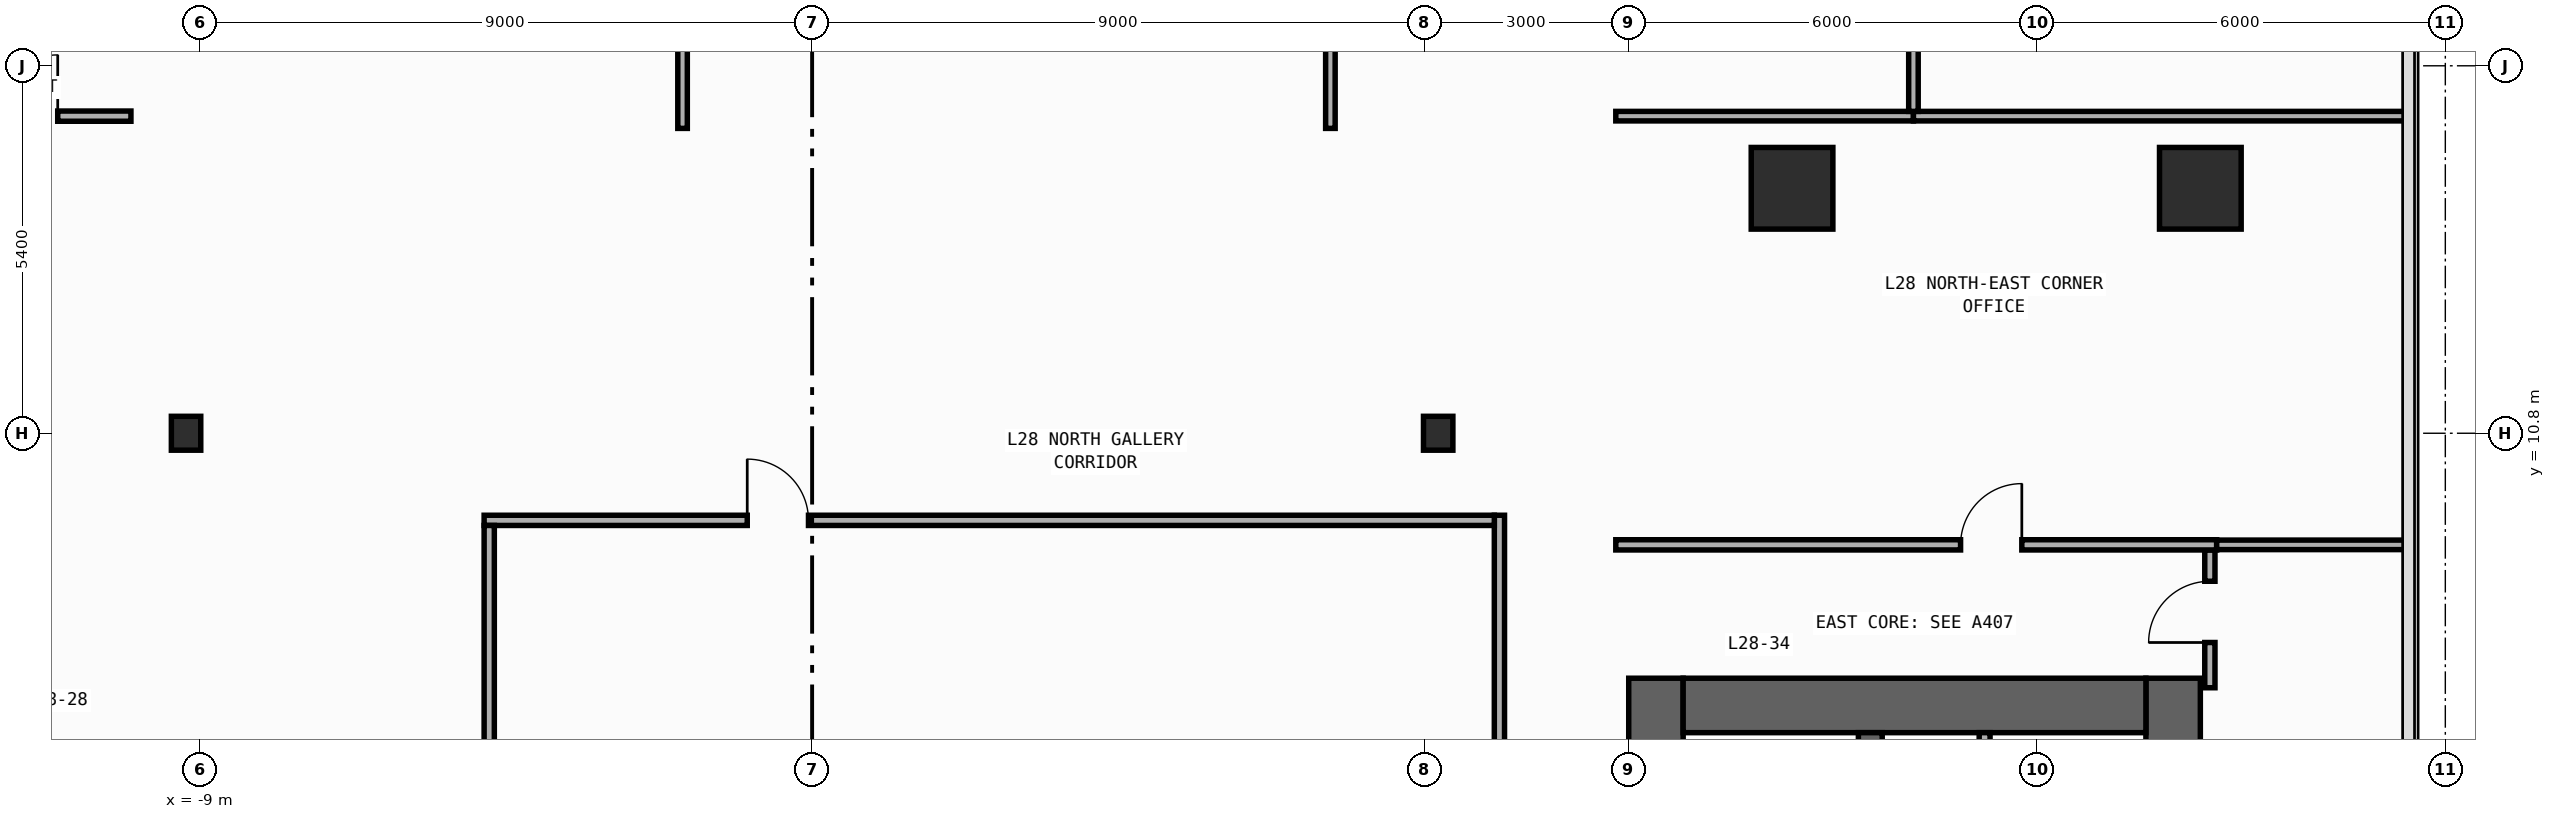
"""IFC4 building model, lengths in metres.
Left out: names, types, materials, properties, quantities, classifications, styles, units other than length and angle.
Written with IfcOpenShell. Run it as: python <this file> out.ifc"""

import sys

from ifc_helpers import new_model, si_unit, direction, frame, frame_2d, origin, origin_2d, place, context, subcontext, project, spatial, rectangle, i_section, extrude, element, fill, save


model = new_model("IFC4")
c1 = context("Model", 3, precision=1e-05, world=origin(), true_north=direction((0.0, 1.0)))
c2 = subcontext(c1, "Body", "Model", "MODEL_VIEW")
j1 = project(units=[si_unit("LENGTHUNIT", "METRE"), si_unit("PLANEANGLEUNIT", "RADIAN")], contexts=[c1])
p1 = place(None, origin())
s1 = spatial("IfcSite", under=j1, at=p1, CompositionType="ELEMENT")
p2 = place(p1, origin())
s2 = spatial("IfcBuilding", under=s1, at=p2, CompositionType="ELEMENT")
p3 = place(p2, frame((0.0, 0.0, 122.6)))
s3 = spatial("IfcBuildingStorey", under=s2, at=p3, CompositionType="ELEMENT", Elevation=122.6)
p4 = place(p3, frame((12.4, -19.8, 0.0), z_axis=(0.0, 0.0, 1.0), x_axis=(0.0, 1.0, 0.0)))
e1 = element("IfcWall", 1, at=p4, inside=s3, PredefinedType="SHEAR", context=c2, shape_type="SweptSolid", body=[
    extrude(rectangle(XDim=27.0, YDim=0.8, at=frame_2d((13.5, 0.0))), origin(), (0.0, 0.0, 1.0), 3.94),
])
p5 = place(p4, frame((23.05, 0.0, 0.0)))
e2 = element("IfcOpeningElement", 2, at=p5, cuts=e1, PredefinedType="OPENING", context=c2, shape_type="SweptSolid", body=[
    extrude(rectangle(XDim=1.1, YDim=2.2, at=frame_2d((0.55, 1.1))), frame((0.0, 0.41, 0.0), z_axis=(0.0, -1.0, 0.0), x_axis=(1.0, 0.0, 0.0)), (0.0, 0.0, 1.0), 0.82),
])
p6 = place(p4, frame((19.85, 0.0, 0.0)))
e3 = element("IfcOpeningElement", 3, at=p6, cuts=e1, PredefinedType="OPENING", context=c2, shape_type="SweptSolid", body=[
    extrude(rectangle(XDim=1.1, YDim=2.2, at=frame_2d((0.55, 1.1))), frame((0.0, 0.41, 0.0), z_axis=(0.0, -1.0, 0.0), x_axis=(1.0, 0.0, 0.0)), (0.0, 0.0, 1.0), 0.82),
])
p7 = place(p4, frame((16.65, 0.0, 0.0)))
e4 = element("IfcOpeningElement", 4, at=p7, cuts=e1, PredefinedType="OPENING", context=c2, shape_type="SweptSolid", body=[
    extrude(rectangle(XDim=1.1, YDim=2.2, at=frame_2d((0.55, 1.1))), frame((0.0, 0.41, 0.0), z_axis=(0.0, -1.0, 0.0), x_axis=(1.0, 0.0, 0.0)), (0.0, 0.0, 1.0), 0.82),
])
p8 = place(p4, frame((7.175, 0.0, 0.0)))
e5 = element("IfcOpeningElement", 5, at=p8, cuts=e1, PredefinedType="OPENING", context=c2, shape_type="SweptSolid", body=[
    extrude(rectangle(XDim=0.85, YDim=2.1, at=frame_2d((0.425, 1.05))), frame((0.0, 0.41, 0.0), z_axis=(0.0, -1.0, 0.0), x_axis=(1.0, 0.0, 0.0)), (0.0, 0.0, 1.0), 0.82),
])
p9 = place(p4, frame((10.375, 0.0, 0.0)))
e6 = element("IfcOpeningElement", 6, at=p9, cuts=e1, PredefinedType="OPENING", context=c2, shape_type="SweptSolid", body=[
    extrude(rectangle(XDim=0.85, YDim=2.1, at=frame_2d((0.425, 1.05))), frame((0.0, 0.41, 0.0), z_axis=(0.0, -1.0, 0.0), x_axis=(1.0, 0.0, 0.0)), (0.0, 0.0, 1.0), 0.82),
])
p10 = place(p4, frame((12.725, 0.0, 0.0)))
e7 = element("IfcOpeningElement", 7, at=p10, cuts=e1, PredefinedType="OPENING", context=c2, shape_type="SweptSolid", body=[
    extrude(rectangle(XDim=1.15, YDim=2.2, at=frame_2d((0.575, 1.1))), frame((0.0, 0.41, 0.0), z_axis=(0.0, -1.0, 0.0), x_axis=(1.0, 0.0, 0.0)), (0.0, 0.0, 1.0), 0.82),
])
p11 = place(p4, frame((25.125, 0.0, 0.0)))
e8 = element("IfcOpeningElement", 8, at=p11, cuts=e1, PredefinedType="OPENING", context=c2, shape_type="SweptSolid", body=[
    extrude(rectangle(XDim=0.85, YDim=2.1, at=frame_2d((0.425, 1.05))), frame((0.0, 0.41, 0.0), z_axis=(0.0, -1.0, 0.0), x_axis=(1.0, 0.0, 0.0)), (0.0, 0.0, 1.0), 0.82),
])
p12 = place(p3, frame((20.0, -19.8, 0.0), z_axis=(0.0, 0.0, 1.0), x_axis=(0.0, 1.0, 0.0)))
e9 = element("IfcWall", 9, at=p12, inside=s3, PredefinedType="SHEAR", context=c2, shape_type="SweptSolid", body=[
    extrude(rectangle(XDim=27.0, YDim=0.8, at=frame_2d((13.5, 0.0))), origin(), (0.0, 0.0, 1.0), 3.94),
])
p13 = place(p3, frame((12.8, 6.8, 0.0), z_axis=(0.0, 0.0, 1.0), x_axis=(1.0, 0.0, 0.0)))
e10 = element("IfcWall", 10, at=p13, inside=s3, PredefinedType="SHEAR", context=c2, shape_type="SweptSolid", body=[
    extrude(rectangle(XDim=6.8, YDim=0.8, at=frame_2d((3.4, 0.0))), origin(), (0.0, 0.0, 1.0), 3.94),
])
p14 = place(p3, frame((15.55, -19.0, 0.0), z_axis=(0.0, 0.0, 1.0), x_axis=(0.0, 1.0, 0.0)))
e11 = element("IfcWall", 11, at=p14, inside=s3, PredefinedType="SHEAR", context=c2, shape_type="SweptSolid", body=[
    extrude(rectangle(XDim=25.4, YDim=0.35, at=frame_2d((12.7, 0.0))), origin(), (0.0, 0.0, 1.0), 3.94),
])
p15 = place(p14, frame((11.925, 0.0, 0.0)))
e12 = element("IfcOpeningElement", 12, at=p15, cuts=e11, PredefinedType="OPENING", context=c2, shape_type="SweptSolid", body=[
    extrude(rectangle(XDim=1.15, YDim=2.2, at=frame_2d((0.575, 1.1))), frame((0.0, 0.185, 0.0), z_axis=(0.0, -1.0, 0.0), x_axis=(1.0, 0.0, 0.0)), (0.0, 0.0, 1.0), 0.37),
])
p16 = place(p14, frame((24.325, 0.0, 0.0)))
e13 = element("IfcOpeningElement", 13, at=p16, cuts=e11, PredefinedType="OPENING", context=c2, shape_type="SweptSolid", body=[
    extrude(rectangle(XDim=0.85, YDim=2.1, at=frame_2d((0.425, 1.05))), frame((0.0, 0.185, 0.0), z_axis=(0.0, -1.0, 0.0), x_axis=(1.0, 0.0, 0.0)), (0.0, 0.0, 1.0), 0.37),
])
for number, where, z_axis, x_axis in (
    (14, (-9.2, 10.8, 0.0), (0.0, 0.0, 1.0), (1.0, 0.0, 0.0)),
    (15, (9.2, 10.8, 0.0), (0.0, 0.0, 1.0), (1.0, 0.0, 0.0)),
):
    element("IfcColumn", number, at=place(p3, frame(where, z_axis=z_axis, x_axis=x_axis)), inside=s3, PredefinedType="COLUMN", context=c2, shape_type="SweptSolid", body=[
        extrude(i_section(OverallWidth=0.432, OverallDepth=0.498, WebThickness=0.045, FlangeThickness=0.07, FilletRadius=0.022, at=origin_2d()), origin(), (0.0, 0.0, 1.0), 4.2),
    ])
for number, where, z_axis, x_axis in (
    (16, (20.4, 14.4, 0.0), (0.0, 0.0, 1.0), (1.0, 0.0, 0.0)),
    (17, (14.4, 14.4, 0.0), (0.0, 0.0, 1.0), (1.0, 0.0, 0.0)),
):
    element("IfcColumn", number, at=place(p3, frame(where, z_axis=z_axis, x_axis=x_axis)), inside=s3, PredefinedType="COLUMN", context=c2, shape_type="SweptSolid", body=[
        extrude(rectangle(XDim=1.2, YDim=1.2, at=origin_2d()), origin(), (0.0, 0.0, 1.0), 4.2),
    ])
p17 = place(p3, frame((17.23, 4.17, 0.0), z_axis=(0.0, 0.0, 1.0), x_axis=(0.0, 1.0, 0.0)))
e18 = element("IfcWall", 18, at=p17, inside=s3, PredefinedType="PARTITIONING", context=c2, shape_type="SweptSolid", body=[
    extrude(rectangle(XDim=2.23, YDim=0.16, at=frame_2d((1.115, 0.0))), origin(), (0.0, 0.0, 1.0), 3.94),
])
p18 = place(p17, frame((0.46, 0.0, 0.0)))
e19 = element("IfcOpeningElement", 19, at=p18, cuts=e18, PredefinedType="OPENING", context=c2, shape_type="SweptSolid", body=[
    extrude(rectangle(XDim=0.85, YDim=2.1, at=frame_2d((0.425, 1.05))), frame((0.0, 0.09, 0.0), z_axis=(0.0, -1.0, 0.0), x_axis=(1.0, 0.0, 0.0)), (0.0, 0.0, 1.0), 0.18),
])
p19 = place(p3, frame((-12.446, 15.46, 0.0), z_axis=(0.0, 0.0, 1.0), x_axis=(1.0, 0.0, 0.0)))
e20 = element("IfcWall", 20, at=p19, inside=s3, PredefinedType="PARTITIONING", context=c2, shape_type="SweptSolid", body=[
    extrude(rectangle(XDim=2.436, YDim=0.15, at=frame_2d((1.218, 0.0))), origin(), (0.0, 0.0, 1.0), 3.94),
])
p20 = place(p19, frame((0.46, 0.0, 0.0)))
e21 = element("IfcOpeningElement", 21, at=p20, cuts=e20, PredefinedType="OPENING", context=c2, shape_type="SweptSolid", body=[
    extrude(rectangle(XDim=0.9, YDim=2.15, at=frame_2d((0.45, 1.075))), frame((0.0, 0.085, 0.0), z_axis=(0.0, -1.0, 0.0), x_axis=(1.0, 0.0, 0.0)), (0.0, 0.0, 1.0), 0.17),
])
p21 = place(p3, frame((10.1, -7.78, 0.0), z_axis=(0.0, 0.0, 1.0), x_axis=(0.0, 1.0, 0.0)))
e22 = element("IfcWall", 22, at=p21, inside=s3, PredefinedType="PARTITIONING", context=c2, shape_type="SweptSolid", body=[
    extrude(rectangle(XDim=17.375, YDim=0.15, at=frame_2d((8.688, 0.0))), origin(), (0.0, 0.0, 1.0), 3.94),
])
p22 = place(p21, frame((12.783, 0.0, 0.0)))
e23 = element("IfcOpeningElement", 23, at=p22, cuts=e22, PredefinedType="OPENING", context=c2, shape_type="SweptSolid", body=[
    extrude(rectangle(XDim=0.9, YDim=2.15, at=frame_2d((0.45, 1.075))), frame((0.0, 0.085, 0.0), z_axis=(0.0, -1.0, 0.0), x_axis=(1.0, 0.0, 0.0)), (0.0, 0.0, 1.0), 0.17),
])
p23 = place(p3, frame((-4.82, 9.52, 0.0), z_axis=(0.0, 0.0, 1.0), x_axis=(1.0, 0.0, 0.0)))
e24 = element("IfcWall", 24, at=p23, inside=s3, PredefinedType="PARTITIONING", context=c2, shape_type="SweptSolid", body=[
    extrude(rectangle(XDim=14.845, YDim=0.15, at=frame_2d((7.422, 0.0))), origin(), (0.0, 0.0, 1.0), 3.94),
])
p24 = place(p23, frame((3.866, 0.0, 0.0)))
e25 = element("IfcOpeningElement", 25, at=p24, cuts=e24, PredefinedType="OPENING", context=c2, shape_type="SweptSolid", body=[
    extrude(rectangle(XDim=0.9, YDim=2.15, at=frame_2d((0.45, 1.075))), frame((0.0, 0.085, 0.0), z_axis=(0.0, -1.0, 0.0), x_axis=(1.0, 0.0, 0.0)), (0.0, 0.0, 1.0), 0.17),
])
p25 = place(p3, frame((-4.745, -7.62, 0.0), z_axis=(0.0, 0.0, 1.0), x_axis=(0.0, 1.0, 0.0)))
e26 = element("IfcWall", 26, at=p25, inside=s3, PredefinedType="PARTITIONING", context=c2, shape_type="SweptSolid", body=[
    extrude(rectangle(XDim=17.065, YDim=0.15, at=frame_2d((8.533, 0.0))), origin(), (0.0, 0.0, 1.0), 3.49),
])
p26 = place(p25, frame((12.496, 0.0, 0.0)))
e27 = element("IfcOpeningElement", 27, at=p26, cuts=e26, PredefinedType="OPENING", context=c2, shape_type="SweptSolid", body=[
    extrude(rectangle(XDim=0.9, YDim=2.15, at=frame_2d((0.45, 1.075))), frame((0.0, 0.085, 0.0), z_axis=(0.0, -1.0, 0.0), x_axis=(1.0, 0.0, 0.0)), (0.0, 0.0, 1.0), 0.17),
])
p27 = place(p3, frame((20.54, 7.06, 0.0), z_axis=(0.0, 0.0, 1.0), x_axis=(0.0, 1.0, 0.0)))
e28 = element("IfcWall", 28, at=p27, inside=s3, PredefinedType="PARTITIONING", context=c2, shape_type="SweptSolid", body=[
    extrude(rectangle(XDim=2.025, YDim=0.15, at=frame_2d((1.012, 0.0))), origin(), (0.0, 0.0, 1.0), 3.94),
])
p28 = place(p27, frame((0.665, 0.0, 0.0)))
e29 = element("IfcOpeningElement", 29, at=p28, cuts=e28, PredefinedType="OPENING", context=c2, shape_type="SweptSolid", body=[
    extrude(rectangle(XDim=0.9, YDim=2.15, at=frame_2d((0.45, 1.075))), frame((0.0, 0.085, 0.0), z_axis=(0.0, -1.0, 0.0), x_axis=(1.0, 0.0, 0.0)), (0.0, 0.0, 1.0), 0.17),
])
p29 = place(p3, frame((11.81, 9.16, 0.0), z_axis=(0.0, 0.0, 1.0), x_axis=(1.0, 0.0, 0.0)))
e30 = element("IfcWall", 30, at=p29, inside=s3, PredefinedType="PARTITIONING", context=c2, shape_type="SweptSolid", body=[
    extrude(rectangle(XDim=8.83, YDim=0.15, at=frame_2d((4.415, 0.0))), origin(), (0.0, 0.0, 1.0), 3.94),
])
p30 = place(p29, frame((5.067, 0.0, 0.0)))
e31 = element("IfcOpeningElement", 31, at=p30, cuts=e30, PredefinedType="OPENING", context=c2, shape_type="SweptSolid", body=[
    extrude(rectangle(XDim=0.9, YDim=2.15, at=frame_2d((0.45, 1.075))), frame((0.0, 0.085, 0.0), z_axis=(0.0, -1.0, 0.0), x_axis=(1.0, 0.0, 0.0)), (0.0, 0.0, 1.0), 0.17),
])
p31 = place(p3, frame((20.64, 9.16, 0.0), z_axis=(0.0, 0.0, 1.0), x_axis=(1.0, 0.0, 0.0)))
e32 = element("IfcWall", 32, at=p31, inside=s3, PredefinedType="PARTITIONING", context=c2, shape_type="SweptSolid", body=[
    extrude(rectangle(XDim=2.815, YDim=0.14, at=frame_2d((1.408, 0.0))), origin(), (0.0, 0.0, 1.0), 3.94),
])
p32 = place(p3, frame((11.81, 15.46, 0.0), z_axis=(0.0, 0.0, 1.0), x_axis=(1.0, 0.0, 0.0)))
e33 = element("IfcWall", 33, at=p32, inside=s3, PredefinedType="PARTITIONING", context=c2, shape_type="SweptSolid", body=[
    extrude(rectangle(XDim=4.374, YDim=0.14, at=frame_2d((2.187, 0.0))), origin(), (0.0, 0.0, 1.0), 3.94),
])
p33 = place(p3, frame((16.184, 15.46, 0.0), z_axis=(0.0, 0.0, 1.0), x_axis=(1.0, 0.0, 0.0)))
e34 = element("IfcWall", 34, at=p33, inside=s3, PredefinedType="PARTITIONING", context=c2, shape_type="SweptSolid", body=[
    extrude(rectangle(XDim=7.271, YDim=0.14, at=frame_2d((3.635, 0.0))), origin(), (0.0, 0.0, 1.0), 3.94),
])
p34 = place(p3, frame((-1.904, 15.28, 0.0), z_axis=(0.0, 0.0, 1.0), x_axis=(0.0, 1.0, 0.0)))
e35 = element("IfcWall", 35, at=p34, inside=s3, PredefinedType="PARTITIONING", context=c2, shape_type="SweptSolid", body=[
    extrude(rectangle(XDim=10.875, YDim=0.14, at=frame_2d((5.438, 0.0))), origin(), (0.0, 0.0, 1.0), 3.94),
])
p35 = place(p34, frame((9.565, 0.0, 0.0)))
e36 = element("IfcOpeningElement", 36, at=p35, cuts=e35, PredefinedType="OPENING", context=c2, shape_type="SweptSolid", body=[
    extrude(rectangle(XDim=0.85, YDim=2.1, at=frame_2d((0.425, 1.05))), frame((0.0, 0.08, 0.0), z_axis=(0.0, -1.0, 0.0), x_axis=(1.0, 0.0, 0.0)), (0.0, 0.0, 1.0), 0.16),
])
p36 = place(p3, frame((7.616, 15.28, 0.0), z_axis=(0.0, 0.0, 1.0), x_axis=(0.0, 1.0, 0.0)))
e37 = element("IfcWall", 37, at=p36, inside=s3, PredefinedType="PARTITIONING", context=c2, shape_type="SweptSolid", body=[
    extrude(rectangle(XDim=10.875, YDim=0.14, at=frame_2d((5.438, 0.0))), origin(), (0.0, 0.0, 1.0), 3.94),
])
p37 = place(p36, frame((9.565, 0.0, 0.0)))
e38 = element("IfcOpeningElement", 38, at=p37, cuts=e37, PredefinedType="OPENING", context=c2, shape_type="SweptSolid", body=[
    extrude(rectangle(XDim=0.85, YDim=2.1, at=frame_2d((0.425, 1.05))), frame((0.0, 0.08, 0.0), z_axis=(0.0, -1.0, 0.0), x_axis=(1.0, 0.0, 0.0)), (0.0, 0.0, 1.0), 0.16),
])
p38 = place(p3, frame((16.184, 15.53, 0.0), z_axis=(0.0, 0.0, 1.0), x_axis=(0.0, 1.0, 0.0)))
e39 = element("IfcWall", 39, at=p38, inside=s3, PredefinedType="PARTITIONING", context=c2, shape_type="SweptSolid", body=[
    extrude(rectangle(XDim=10.625, YDim=0.14, at=frame_2d((5.312, 0.0))), origin(), (0.0, 0.0, 1.0), 3.94),
])
p39 = place(p38, frame((3.68, 0.0, 0.0)))
e40 = element("IfcOpeningElement", 40, at=p39, cuts=e39, PredefinedType="OPENING", context=c2, shape_type="SweptSolid", body=[
    extrude(rectangle(XDim=0.85, YDim=2.1, at=frame_2d((0.425, 1.05))), frame((0.0, 0.08, 0.0), z_axis=(0.0, -1.0, 0.0), x_axis=(1.0, 0.0, 0.0)), (0.0, 0.0, 1.0), 0.16),
])
p40 = place(p20, origin())
e41 = element("IfcDoor", 41, at=p40, inside=s3, OperationType="SINGLE_SWING_RIGHT", PredefinedType="DOOR", context=c2, shape_type="SweptSolid", body=[
    extrude(rectangle(XDim=0.9, YDim=2.15, at=frame_2d((0.45, 1.075))), frame((0.0, 0.025, 0.0), z_axis=(0.0, -1.0, 0.0), x_axis=(1.0, 0.0, 0.0)), (0.0, 0.0, 1.0), 0.05),
])
fill(e21, e41)
p41 = place(p24, origin())
e42 = element("IfcDoor", 42, at=p41, inside=s3, OperationType="SINGLE_SWING_LEFT", PredefinedType="DOOR", context=c2, shape_type="SweptSolid", body=[
    extrude(rectangle(XDim=0.9, YDim=2.15, at=frame_2d((0.45, 1.075))), frame((0.0, 0.025, 0.0), z_axis=(0.0, -1.0, 0.0), x_axis=(1.0, 0.0, 0.0)), (0.0, 0.0, 1.0), 0.05),
])
fill(e25, e42)
p42 = place(p28, origin())
e43 = element("IfcDoor", 43, at=p42, inside=s3, OperationType="SINGLE_SWING_LEFT", PredefinedType="DOOR", context=c2, shape_type="SweptSolid", body=[
    extrude(rectangle(XDim=0.9, YDim=2.15, at=frame_2d((0.45, 1.075))), frame((0.0, 0.025, 0.0), z_axis=(0.0, -1.0, 0.0), x_axis=(1.0, 0.0, 0.0)), (0.0, 0.0, 1.0), 0.05),
])
fill(e29, e43)
p43 = place(p30, origin())
e44 = element("IfcDoor", 44, at=p43, inside=s3, OperationType="SINGLE_SWING_RIGHT", PredefinedType="DOOR", context=c2, shape_type="SweptSolid", body=[
    extrude(rectangle(XDim=0.9, YDim=2.15, at=frame_2d((0.45, 1.075))), frame((0.0, 0.025, 0.0), z_axis=(0.0, -1.0, 0.0), x_axis=(1.0, 0.0, 0.0)), (0.0, 0.0, 1.0), 0.05),
])
fill(e31, e44)
save(model, sys.argv[1])
